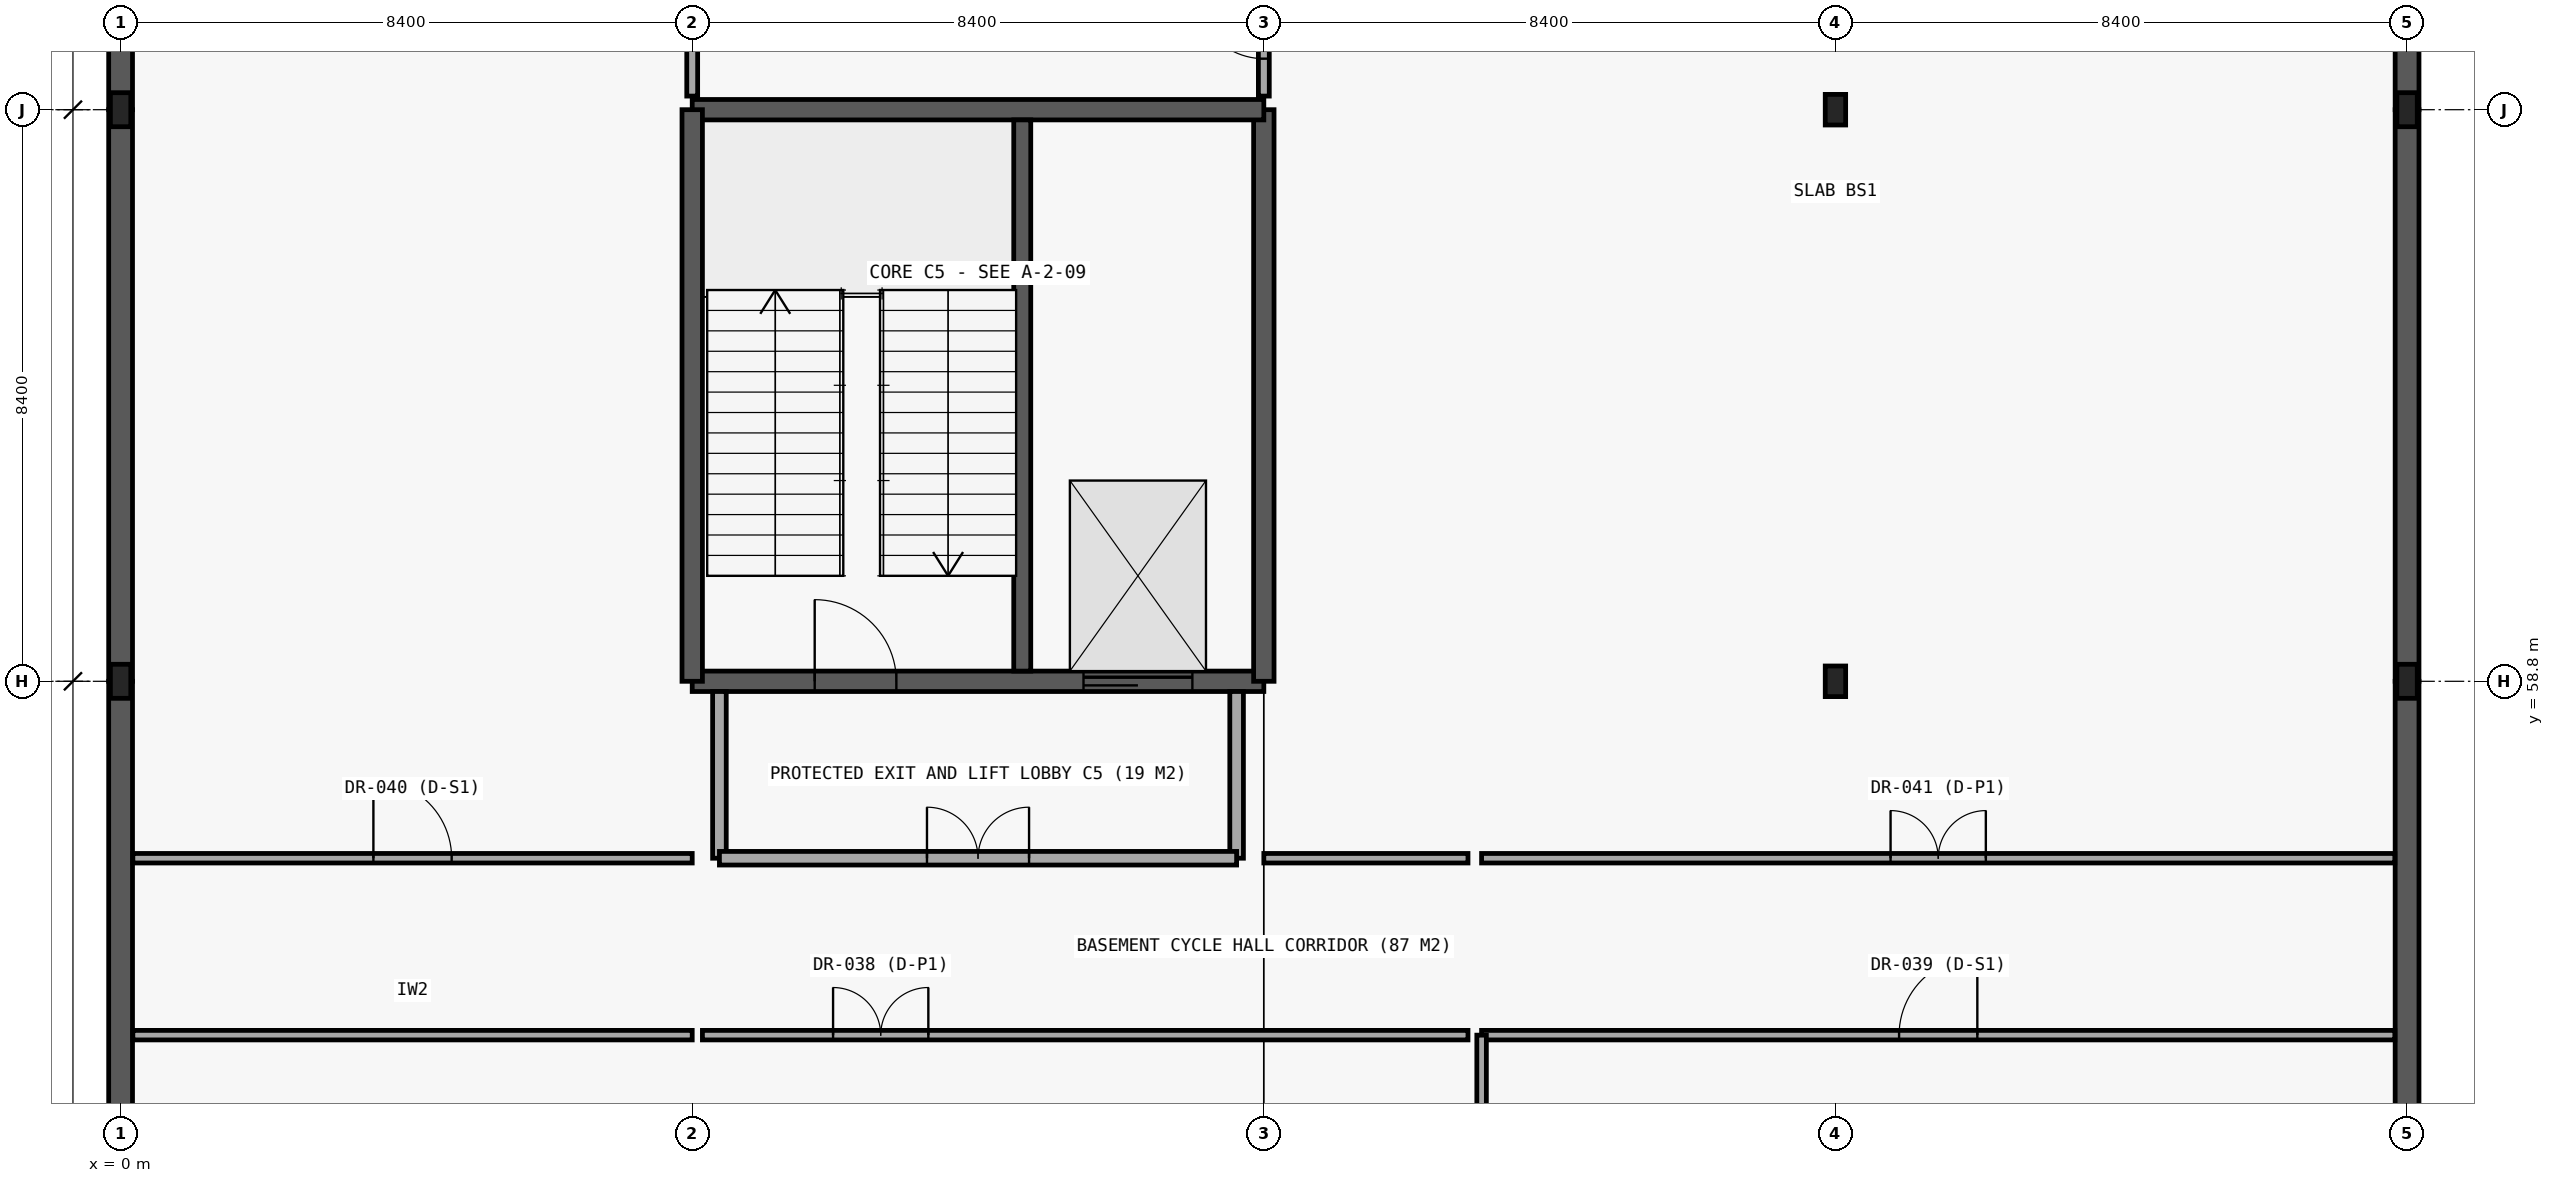
"""IFC4 building model, lengths in metres.
Left out: names, types, materials, properties, quantities, classifications, styles, units other than length and angle.
Written with IfcOpenShell. Run it as: python <this file> out.ifc"""

import sys

from ifc_helpers import new_model, si_unit, direction, frame, frame_2d, origin, origin_2d, place, context, subcontext, project, spatial, rectangle, i_section, extrude, element, fill, save


model = new_model("IFC4")
c1 = context("Model", 3, precision=1e-05, world=origin(), true_north=direction((0.0, 1.0)))
c2 = subcontext(c1, "Body", "Model", "MODEL_VIEW")
j1 = project(units=[si_unit("LENGTHUNIT", "METRE"), si_unit("PLANEANGLEUNIT", "RADIAN")], contexts=[c1])
p1 = place(None, origin())
s1 = spatial("IfcSite", under=j1, at=p1, CompositionType="ELEMENT")
p2 = place(p1, origin())
s2 = spatial("IfcBuilding", under=s1, at=p2, CompositionType="ELEMENT")
p3 = place(p2, frame((0.0, 0.0, -4.5)))
s3 = spatial("IfcBuildingStorey", under=s2, at=p3, CompositionType="ELEMENT", Elevation=-4.5)
p4 = place(p3, frame((8.4, 58.8, -0.35), z_axis=(0.0, 0.0, 1.0), x_axis=(1.0, 0.0, 0.0)))
e1 = element("IfcWall", 1, at=p4, inside=s3, PredefinedType="SHEAR", context=c2, shape_type="SweptSolid", body=[
    extrude(rectangle(XDim=8.4, YDim=0.3, at=frame_2d((4.2, 0.0))), origin(), (0.0, 0.0, 1.0), 4.85),
])
p5 = place(p4, frame((1.8, 0.0, 0.35)))
e2 = element("IfcOpeningElement", 2, at=p5, cuts=e1, PredefinedType="OPENING", context=c2, shape_type="SweptSolid", body=[
    extrude(rectangle(XDim=1.2, YDim=2.2, at=frame_2d((0.6, 1.1))), frame((0.0, 0.16, 0.0), z_axis=(0.0, -1.0, 0.0), x_axis=(1.0, 0.0, 0.0)), (0.0, 0.0, 1.0), 0.32),
])
p6 = place(p4, frame((5.75, 0.0, 0.35)))
e3 = element("IfcOpeningElement", 3, at=p6, cuts=e1, PredefinedType="OPENING", context=c2, shape_type="SweptSolid", body=[
    extrude(rectangle(XDim=1.6, YDim=2.4, at=frame_2d((0.8, 1.2))), frame((0.0, 0.16, 0.0), z_axis=(0.0, -1.0, 0.0), x_axis=(1.0, 0.0, 0.0)), (0.0, 0.0, 1.0), 0.32),
])
p7 = place(p3, frame((16.8, 58.8, -0.35), z_axis=(0.0, 0.0, 1.0), x_axis=(0.0, 1.0, 0.0)))
e4 = element("IfcWall", 4, at=p7, inside=s3, PredefinedType="SHEAR", context=c2, shape_type="SweptSolid", body=[
    extrude(rectangle(XDim=8.4, YDim=0.3, at=frame_2d((4.2, 0.0))), origin(), (0.0, 0.0, 1.0), 4.85),
])
p8 = place(p3, frame((16.8, 67.2, -0.35), z_axis=(0.0, 0.0, 1.0), x_axis=(-1.0, 0.0, 0.0)))
e5 = element("IfcWall", 5, at=p8, inside=s3, PredefinedType="SHEAR", context=c2, shape_type="SweptSolid", body=[
    extrude(rectangle(XDim=8.4, YDim=0.3, at=frame_2d((4.2, 0.0))), origin(), (0.0, 0.0, 1.0), 4.85),
])
p9 = place(p3, frame((8.4, 67.2, -0.35), z_axis=(0.0, 0.0, 1.0), x_axis=(0.0, -1.0, 0.0)))
e6 = element("IfcWall", 6, at=p9, inside=s3, PredefinedType="SHEAR", context=c2, shape_type="SweptSolid", body=[
    extrude(rectangle(XDim=8.4, YDim=0.3, at=frame_2d((4.2, 0.0))), origin(), (0.0, 0.0, 1.0), 4.85),
])
p10 = place(p3, frame((13.25, 58.95, -0.35), z_axis=(0.0, 0.0, 1.0), x_axis=(0.0, 1.0, 0.0)))
e7 = element("IfcWall", 7, at=p10, inside=s3, PredefinedType="SHEAR", context=c2, shape_type="SweptSolid", body=[
    extrude(rectangle(XDim=8.1, YDim=0.25, at=frame_2d((4.05, 0.0))), origin(), (0.0, 0.0, 1.0), 4.85),
])
p11 = place(p3, frame((0.0, 58.8, -0.35), z_axis=(0.0, 0.0, 1.0), x_axis=(0.0, -1.0, 0.0)))
e8 = element("IfcWall", 8, at=p11, inside=s3, PredefinedType="SOLIDWALL", context=c2, shape_type="SweptSolid", body=[
    extrude(rectangle(XDim=8.4, YDim=0.35, at=frame_2d((4.2, 0.0))), origin(), (0.0, 0.0, 1.0), 4.6),
])
p12 = place(p3, frame((0.0, 67.2, -0.35), z_axis=(0.0, 0.0, 1.0), x_axis=(0.0, -1.0, 0.0)))
e9 = element("IfcWall", 9, at=p12, inside=s3, PredefinedType="SOLIDWALL", context=c2, shape_type="SweptSolid", body=[
    extrude(rectangle(XDim=8.4, YDim=0.35, at=frame_2d((4.2, 0.0))), origin(), (0.0, 0.0, 1.0), 4.6),
])
for number, where, z_axis, x_axis in (
    (10, (0.0, 75.6, -0.35), (0.0, 0.0, 1.0), (0.0, -1.0, 0.0)),
    (11, (33.6, 58.8, -0.35), (0.0, 0.0, 1.0), (0.0, -1.0, 0.0)),
):
    element("IfcWall", number, at=place(p3, frame(where, z_axis=z_axis, x_axis=x_axis)), inside=s3, PredefinedType="SOLIDWALL", context=c2, shape_type="SweptSolid", body=[
        extrude(rectangle(XDim=8.4, YDim=0.35, at=frame_2d((4.2, 0.0))), origin(), (0.0, 0.0, 1.0), 4.6),
    ])
p13 = place(p3, frame((33.6, 67.2, -0.35), z_axis=(0.0, 0.0, 1.0), x_axis=(0.0, -1.0, 0.0)))
e12 = element("IfcWall", 12, at=p13, inside=s3, PredefinedType="SOLIDWALL", context=c2, shape_type="SweptSolid", body=[
    extrude(rectangle(XDim=8.4, YDim=0.35, at=frame_2d((4.2, 0.0))), origin(), (0.0, 0.0, 1.0), 4.6),
])
p14 = place(p3, frame((33.6, 75.6, -0.35), z_axis=(0.0, 0.0, 1.0), x_axis=(0.0, -1.0, 0.0)))
e13 = element("IfcWall", 13, at=p14, inside=s3, PredefinedType="SOLIDWALL", context=c2, shape_type="SweptSolid", body=[
    extrude(rectangle(XDim=8.4, YDim=0.35, at=frame_2d((4.2, 0.0))), origin(), (0.0, 0.0, 1.0), 4.6),
])
for number, where, z_axis, x_axis in (
    (14, (0.0, 58.8, -0.35), (0.0, 0.0, 1.0), (1.0, 0.0, 0.0)),
    (15, (0.0, 67.2, -0.35), (0.0, 0.0, 1.0), (1.0, 0.0, 0.0)),
):
    element("IfcColumn", number, at=place(p3, frame(where, z_axis=z_axis, x_axis=x_axis)), inside=s3, PredefinedType="COLUMN", context=c2, shape_type="SweptSolid", body=[
        extrude(i_section(OverallWidth=0.3, OverallDepth=0.5, WebThickness=0.014, FlangeThickness=0.028, FilletRadius=0.027, at=origin_2d()), origin(), (0.0, 0.0, 1.0), 4.85),
    ])
for number, where, z_axis, x_axis in (
    (16, (25.2, 58.8, -0.35), (0.0, 0.0, 1.0), (1.0, 0.0, 0.0)),
    (17, (25.2, 67.2, -0.35), (0.0, 0.0, 1.0), (1.0, 0.0, 0.0)),
):
    element("IfcColumn", number, at=place(p3, frame(where, z_axis=z_axis, x_axis=x_axis)), inside=s3, PredefinedType="COLUMN", context=c2, shape_type="SweptSolid", body=[
        extrude(i_section(OverallWidth=0.3, OverallDepth=0.45, WebThickness=0.014, FlangeThickness=0.026, FilletRadius=0.027, at=origin_2d()), origin(), (0.0, 0.0, 1.0), 4.85),
    ])
for number, where, z_axis, x_axis in (
    (18, (33.6, 58.8, -0.35), (0.0, 0.0, 1.0), (1.0, 0.0, 0.0)),
    (19, (33.6, 67.2, -0.35), (0.0, 0.0, 1.0), (1.0, 0.0, 0.0)),
):
    element("IfcColumn", number, at=place(p3, frame(where, z_axis=z_axis, x_axis=x_axis)), inside=s3, PredefinedType="COLUMN", context=c2, shape_type="SweptSolid", body=[
        extrude(i_section(OverallWidth=0.3, OverallDepth=0.5, WebThickness=0.014, FlangeThickness=0.028, FilletRadius=0.027, at=origin_2d()), origin(), (0.0, 0.0, 1.0), 4.85),
    ])
p15 = place(p3, frame((8.8, 56.2, 0.0), z_axis=(0.0, 0.0, 1.0), x_axis=(0.0, 1.0, 0.0)))
e20 = element("IfcWall", 20, at=p15, inside=s3, PredefinedType="PARTITIONING", context=c2, shape_type="SweptSolid", body=[
    extrude(rectangle(XDim=2.45, YDim=0.2, at=frame_2d((1.225, 0.0))), origin(), (0.0, 0.0, 1.0), 3.82),
])
p16 = place(p3, frame((16.4, 56.2, 0.0), z_axis=(0.0, 0.0, 1.0), x_axis=(0.0, 1.0, 0.0)))
e21 = element("IfcWall", 21, at=p16, inside=s3, PredefinedType="PARTITIONING", context=c2, shape_type="SweptSolid", body=[
    extrude(rectangle(XDim=2.45, YDim=0.2, at=frame_2d((1.225, 0.0))), origin(), (0.0, 0.0, 1.0), 3.76),
])
p17 = place(p3, frame((8.8, 56.2, 0.0), z_axis=(0.0, 0.0, 1.0), x_axis=(1.0, 0.0, 0.0)))
e22 = element("IfcWall", 22, at=p17, inside=s3, PredefinedType="PARTITIONING", context=c2, shape_type="SweptSolid", body=[
    extrude(rectangle(XDim=7.6, YDim=0.2, at=frame_2d((3.8, 0.0))), origin(), (0.0, 0.0, 1.0), 3.82),
])
p18 = place(p17, frame((3.05, 0.0, 0.0)))
e23 = element("IfcOpeningElement", 23, at=p18, cuts=e22, PredefinedType="OPENING", context=c2, shape_type="SweptSolid", body=[
    extrude(rectangle(XDim=1.5, YDim=2.2, at=frame_2d((0.75, 1.1))), frame((0.0, 0.11, 0.0), z_axis=(0.0, -1.0, 0.0), x_axis=(1.0, 0.0, 0.0)), (0.0, 0.0, 1.0), 0.22),
])
p19 = place(p3, frame((0.18, 53.6, 0.0), z_axis=(0.0, 0.0, 1.0), x_axis=(1.0, 0.0, 0.0)))
e24 = element("IfcWall", 24, at=p19, inside=s3, PredefinedType="PARTITIONING", context=c2, shape_type="SweptSolid", body=[
    extrude(rectangle(XDim=8.22, YDim=0.14, at=frame_2d((4.11, 0.0))), origin(), (0.0, 0.0, 1.0), 3.8),
])
p20 = place(p3, frame((8.55, 53.6, 0.0), z_axis=(0.0, 0.0, 1.0), x_axis=(1.0, 0.0, 0.0)))
e25 = element("IfcWall", 25, at=p20, inside=s3, PredefinedType="PARTITIONING", context=c2, shape_type="SweptSolid", body=[
    extrude(rectangle(XDim=11.25, YDim=0.14, at=frame_2d((5.625, 0.0))), origin(), (0.0, 0.0, 1.0), 3.8),
])
p21 = place(p20, frame((1.92, 0.0, 0.0)))
e26 = element("IfcOpeningElement", 26, at=p21, cuts=e25, PredefinedType="OPENING", context=c2, shape_type="SweptSolid", body=[
    extrude(rectangle(XDim=1.4, YDim=2.25, at=frame_2d((0.7, 1.125))), frame((0.0, 0.08, 0.0), z_axis=(0.0, -1.0, 0.0), x_axis=(1.0, 0.0, 0.0)), (0.0, 0.0, 1.0), 0.16),
])
p22 = place(p3, frame((20.0, 53.6, 0.0), z_axis=(0.0, 0.0, 1.0), x_axis=(1.0, 0.0, 0.0)))
e27 = element("IfcWall", 27, at=p22, inside=s3, PredefinedType="PARTITIONING", context=c2, shape_type="SweptSolid", body=[
    extrude(rectangle(XDim=13.42, YDim=0.14, at=frame_2d((6.71, 0.0))), origin(), (0.0, 0.0, 1.0), 3.8),
])
p23 = place(p22, frame((6.135, 0.0, 0.0)))
e28 = element("IfcOpeningElement", 28, at=p23, cuts=e27, PredefinedType="OPENING", context=c2, shape_type="SweptSolid", body=[
    extrude(rectangle(XDim=1.15, YDim=2.15, at=frame_2d((0.575, 1.075))), frame((0.0, 0.08, 0.0), z_axis=(0.0, -1.0, 0.0), x_axis=(1.0, 0.0, 0.0)), (0.0, 0.0, 1.0), 0.16),
])
p24 = place(p3, frame((0.18, 56.2, 0.0), z_axis=(0.0, 0.0, 1.0), x_axis=(1.0, 0.0, 0.0)))
e29 = element("IfcWall", 29, at=p24, inside=s3, PredefinedType="PARTITIONING", context=c2, shape_type="SweptSolid", body=[
    extrude(rectangle(XDim=8.22, YDim=0.14, at=frame_2d((4.11, 0.0))), origin(), (0.0, 0.0, 1.0), 3.8),
])
p25 = place(p24, frame((3.535, 0.0, 0.0)))
e30 = element("IfcOpeningElement", 30, at=p25, cuts=e29, PredefinedType="OPENING", context=c2, shape_type="SweptSolid", body=[
    extrude(rectangle(XDim=1.15, YDim=2.15, at=frame_2d((0.575, 1.075))), frame((0.0, 0.08, 0.0), z_axis=(0.0, -1.0, 0.0), x_axis=(1.0, 0.0, 0.0)), (0.0, 0.0, 1.0), 0.16),
])
p26 = place(p3, frame((16.8, 56.2, 0.0), z_axis=(0.0, 0.0, 1.0), x_axis=(1.0, 0.0, 0.0)))
e31 = element("IfcWall", 31, at=p26, inside=s3, PredefinedType="PARTITIONING", context=c2, shape_type="SweptSolid", body=[
    extrude(rectangle(XDim=3.0, YDim=0.14, at=frame_2d((1.5, 0.0))), origin(), (0.0, 0.0, 1.0), 3.8),
])
p27 = place(p3, frame((20.0, 56.2, 0.0), z_axis=(0.0, 0.0, 1.0), x_axis=(1.0, 0.0, 0.0)))
e32 = element("IfcWall", 32, at=p27, inside=s3, PredefinedType="PARTITIONING", context=c2, shape_type="SweptSolid", body=[
    extrude(rectangle(XDim=13.42, YDim=0.14, at=frame_2d((6.71, 0.0))), origin(), (0.0, 0.0, 1.0), 3.8),
])
p28 = place(p27, frame((6.01, 0.0, 0.0)))
e33 = element("IfcOpeningElement", 33, at=p28, cuts=e32, PredefinedType="OPENING", context=c2, shape_type="SweptSolid", body=[
    extrude(rectangle(XDim=1.4, YDim=2.25, at=frame_2d((0.7, 1.125))), frame((0.0, 0.08, 0.0), z_axis=(0.0, -1.0, 0.0), x_axis=(1.0, 0.0, 0.0)), (0.0, 0.0, 1.0), 0.16),
])
p29 = place(p3, frame((8.4, 67.4, 0.0), z_axis=(0.0, 0.0, 1.0), x_axis=(0.0, 1.0, 0.0)))
e34 = element("IfcWall", 34, at=p29, inside=s3, PredefinedType="PARTITIONING", context=c2, shape_type="SweptSolid", body=[
    extrude(rectangle(XDim=24.85, YDim=0.16, at=frame_2d((12.425, 0.0))), origin(), (0.0, 0.0, 1.0), 3.76),
])
p30 = place(p3, frame((16.8, 67.4, 0.0), z_axis=(0.0, 0.0, 1.0), x_axis=(0.0, 1.0, 0.0)))
e35 = element("IfcWall", 35, at=p30, inside=s3, PredefinedType="PARTITIONING", context=c2, shape_type="SweptSolid", body=[
    extrude(rectangle(XDim=24.85, YDim=0.16, at=frame_2d((12.425, 0.0))), origin(), (0.0, 0.0, 1.0), 3.76),
])
p31 = place(p30, frame((0.55, 0.0, 0.0)))
e36 = element("IfcOpeningElement", 36, at=p31, cuts=e35, PredefinedType="OPENING", context=c2, shape_type="SweptSolid", body=[
    extrude(rectangle(XDim=1.0, YDim=2.15, at=frame_2d((0.5, 1.075))), frame((0.0, 0.09, 0.0), z_axis=(0.0, -1.0, 0.0), x_axis=(1.0, 0.0, 0.0)), (0.0, 0.0, 1.0), 0.18),
])
p32 = place(p3, frame((20.0, 42.0, 0.0), z_axis=(0.0, 0.0, 1.0), x_axis=(0.0, 1.0, 0.0)))
e37 = element("IfcWall", 37, at=p32, inside=s3, PredefinedType="PARTITIONING", context=c2, shape_type="SweptSolid", body=[
    extrude(rectangle(XDim=11.6, YDim=0.14, at=frame_2d((5.8, 0.0))), origin(), (0.0, 0.0, 1.0), 3.8),
])
p33 = place(p5, origin())
e38 = element("IfcDoor", 38, at=p33, inside=s3, OperationType="SINGLE_SWING_LEFT", PredefinedType="DOOR", context=c2, shape_type="SweptSolid", body=[
    extrude(rectangle(XDim=1.2, YDim=2.2, at=frame_2d((0.6, 1.1))), frame((0.0, 0.025, 0.0), z_axis=(0.0, -1.0, 0.0), x_axis=(1.0, 0.0, 0.0)), (0.0, 0.0, 1.0), 0.05),
])
fill(e2, e38)
p34 = place(p6, origin())
e39 = element("IfcDoor", 39, at=p34, inside=s3, OperationType="SLIDING_TO_LEFT", PredefinedType="DOOR", context=c2, shape_type="SweptSolid", body=[
    extrude(rectangle(XDim=1.6, YDim=2.4, at=frame_2d((0.8, 1.2))), frame((0.0, 0.025, 0.0), z_axis=(0.0, -1.0, 0.0), x_axis=(1.0, 0.0, 0.0)), (0.0, 0.0, 1.0), 0.05),
])
fill(e3, e39)
p35 = place(p18, origin())
e40 = element("IfcDoor", 40, at=p35, inside=s3, OperationType="DOUBLE_DOOR_SINGLE_SWING", PredefinedType="DOOR", context=c2, shape_type="SweptSolid", body=[
    extrude(rectangle(XDim=1.5, YDim=2.2, at=frame_2d((0.75, 1.1))), frame((0.0, 0.025, 0.0), z_axis=(0.0, -1.0, 0.0), x_axis=(1.0, 0.0, 0.0)), (0.0, 0.0, 1.0), 0.05),
])
fill(e23, e40)
p36 = place(p21, origin())
e41 = element("IfcDoor", 41, at=p36, inside=s3, OperationType="DOUBLE_DOOR_SINGLE_SWING", PredefinedType="DOOR", context=c2, shape_type="SweptSolid", body=[
    extrude(rectangle(XDim=1.4, YDim=2.25, at=frame_2d((0.7, 1.125))), frame((0.0, 0.025, 0.0), z_axis=(0.0, -1.0, 0.0), x_axis=(1.0, 0.0, 0.0)), (0.0, 0.0, 1.0), 0.05),
])
fill(e26, e41)
p37 = place(p23, origin())
e42 = element("IfcDoor", 42, at=p37, inside=s3, OperationType="SINGLE_SWING_RIGHT", PredefinedType="DOOR", context=c2, shape_type="SweptSolid", body=[
    extrude(rectangle(XDim=1.15, YDim=2.15, at=frame_2d((0.575, 1.075))), frame((0.0, 0.025, 0.0), z_axis=(0.0, -1.0, 0.0), x_axis=(1.0, 0.0, 0.0)), (0.0, 0.0, 1.0), 0.05),
])
fill(e28, e42)
p38 = place(p25, origin())
e43 = element("IfcDoor", 43, at=p38, inside=s3, OperationType="SINGLE_SWING_LEFT", PredefinedType="DOOR", context=c2, shape_type="SweptSolid", body=[
    extrude(rectangle(XDim=1.15, YDim=2.15, at=frame_2d((0.575, 1.075))), frame((0.0, 0.025, 0.0), z_axis=(0.0, -1.0, 0.0), x_axis=(1.0, 0.0, 0.0)), (0.0, 0.0, 1.0), 0.05),
])
fill(e30, e43)
p39 = place(p28, origin())
e44 = element("IfcDoor", 44, at=p39, inside=s3, OperationType="DOUBLE_DOOR_SINGLE_SWING", PredefinedType="DOOR", context=c2, shape_type="SweptSolid", body=[
    extrude(rectangle(XDim=1.4, YDim=2.25, at=frame_2d((0.7, 1.125))), frame((0.0, 0.025, 0.0), z_axis=(0.0, -1.0, 0.0), x_axis=(1.0, 0.0, 0.0)), (0.0, 0.0, 1.0), 0.05),
])
fill(e33, e44)
p40 = place(p31, origin())
e45 = element("IfcDoor", 45, at=p40, inside=s3, OperationType="SINGLE_SWING_RIGHT", PredefinedType="DOOR", context=c2, shape_type="SweptSolid", body=[
    extrude(rectangle(XDim=1.0, YDim=2.15, at=frame_2d((0.5, 1.075))), frame((0.0, 0.025, 0.0), z_axis=(0.0, -1.0, 0.0), x_axis=(1.0, 0.0, 0.0)), (0.0, 0.0, 1.0), 0.05),
])
fill(e36, e45)
save(model, sys.argv[1])
